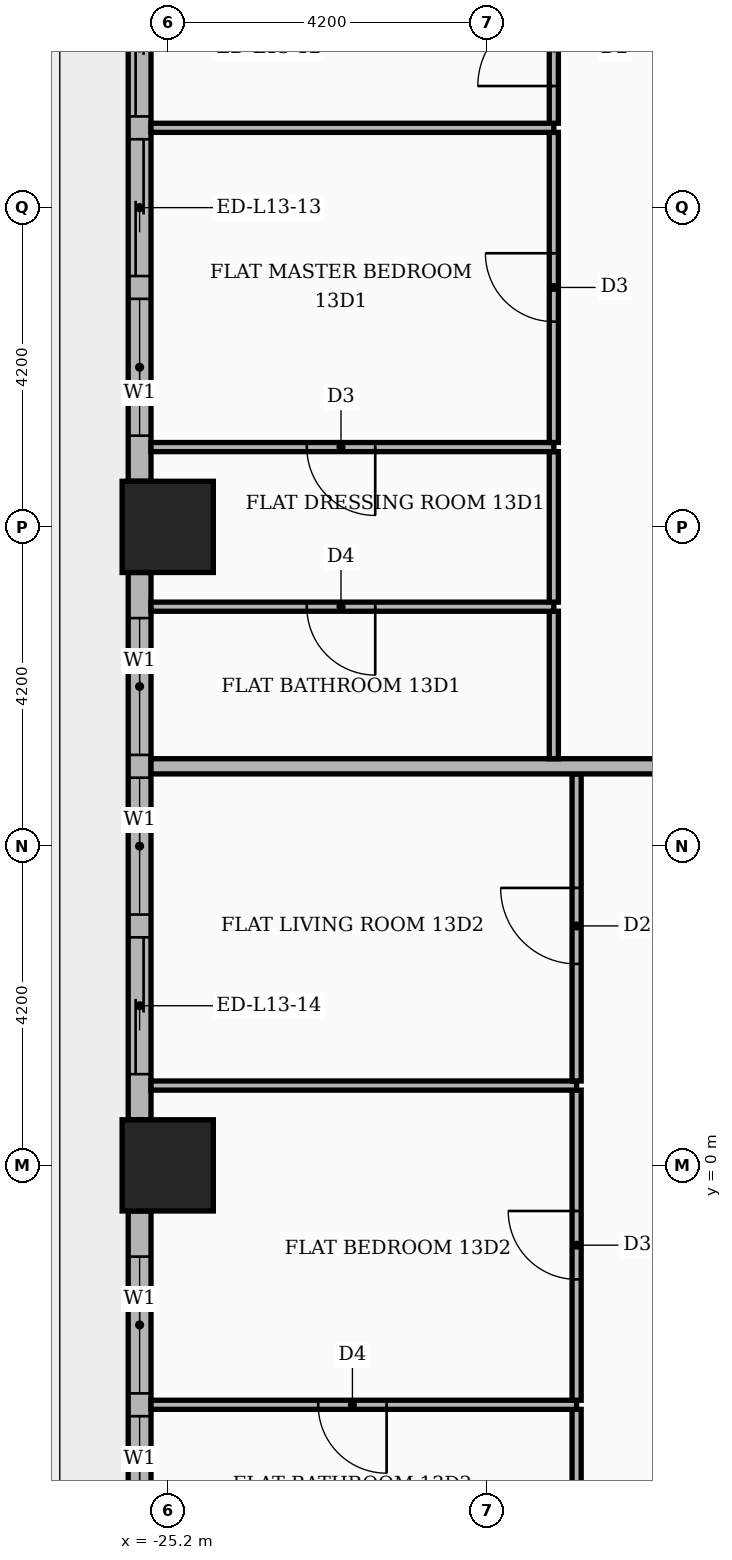
"""IFC4 building model, lengths in metres.
Left out: names, types, materials, properties, quantities, classifications, styles, units other than length and angle.
Written with IfcOpenShell. Run it as: python <this file> out.ifc"""

import sys

from ifc_helpers import new_model, si_unit, direction, frame, frame_2d, origin, origin_2d, place, context, subcontext, project, spatial, rectangle, extrude, element, fill, save


model = new_model("IFC4")
c1 = context("Model", 3, precision=1e-05, world=origin(), true_north=direction((0.0, 1.0)))
c2 = subcontext(c1, "Body", "Model", "MODEL_VIEW")
j1 = project(units=[si_unit("LENGTHUNIT", "METRE"), si_unit("PLANEANGLEUNIT", "RADIAN")], contexts=[c1])
p1 = place(None, origin())
s1 = spatial("IfcSite", under=j1, at=p1, CompositionType="ELEMENT")
p2 = place(p1, origin())
s2 = spatial("IfcBuilding", under=s1, at=p2, CompositionType="ELEMENT")
p3 = place(p2, frame((0.0, 0.0, 58.2)))
s3 = spatial("IfcBuildingStorey", under=s2, at=p3, CompositionType="ELEMENT", Elevation=58.2)
for number, where, z_axis, x_axis in (
    (1, (-25.2, 0.0, 0.0), (0.0, 0.0, 1.0), (1.0, 0.0, 0.0)),
    (2, (-25.2, 8.4, 0.0), (0.0, 0.0, 1.0), (1.0, 0.0, 0.0)),
):
    element("IfcColumn", number, at=place(p3, frame(where, z_axis=z_axis, x_axis=x_axis)), inside=s3, PredefinedType="COLUMN", context=c2, shape_type="SweptSolid", body=[
        extrude(rectangle(XDim=1.2, YDim=1.2, at=origin_2d()), origin(), (0.0, 0.0, 1.0), 3.9),
    ])
p4 = place(p3, frame((-25.57, 16.2, 0.0), z_axis=(0.0, 0.0, 1.0), x_axis=(0.0, -1.0, 0.0)))
e3 = element("IfcWall", 3, at=p4, inside=s3, PredefinedType="STANDARD", context=c2, shape_type="SweptSolid", body=[
    extrude(rectangle(XDim=7.2, YDim=0.3, at=frame_2d((3.6, 0.0))), origin(), (0.0, 0.0, 1.0), 3.48),
])
p5 = place(p4, frame((0.6, 0.0, 0.0)))
e4 = element("IfcOpeningElement", 4, at=p5, cuts=e3, PredefinedType="OPENING", context=c2, shape_type="SweptSolid", body=[
    extrude(rectangle(XDim=1.8, YDim=2.4, at=frame_2d((0.9, 1.2))), frame((0.0, 0.16, 0.0), z_axis=(0.0, -1.0, 0.0), x_axis=(1.0, 0.0, 0.0)), (0.0, 0.0, 1.0), 0.32),
])
p6 = place(p4, frame((2.7, 0.0, 0.0)))
e5 = element("IfcOpeningElement", 5, at=p6, cuts=e3, PredefinedType="OPENING", context=c2, shape_type="SweptSolid", body=[
    extrude(rectangle(XDim=1.8, YDim=2.4, at=frame_2d((0.9, 1.2))), frame((0.0, 0.16, 0.0), z_axis=(0.0, -1.0, 0.0), x_axis=(1.0, 0.0, 0.0)), (0.0, 0.0, 1.0), 0.32),
])
p7 = place(p4, frame((4.8, 0.0, 0.9)))
e6 = element("IfcOpeningElement", 6, at=p7, cuts=e3, PredefinedType="OPENING", context=c2, shape_type="SweptSolid", body=[
    extrude(rectangle(XDim=1.8, YDim=2.1, at=frame_2d((0.9, 1.05))), frame((0.0, 0.16, 0.0), z_axis=(0.0, -1.0, 0.0), x_axis=(1.0, 0.0, 0.0)), (0.0, 0.0, 1.0), 0.32),
])
p8 = place(p3, frame((-25.57, 7.8, 0.0), z_axis=(0.0, 0.0, 1.0), x_axis=(0.0, -1.0, 0.0)))
e7 = element("IfcWall", 7, at=p8, inside=s3, PredefinedType="STANDARD", context=c2, shape_type="SweptSolid", body=[
    extrude(rectangle(XDim=7.2, YDim=0.3, at=frame_2d((3.6, 0.0))), origin(), (0.0, 0.0, 1.0), 3.48),
])
p9 = place(p8, frame((0.6, 0.0, 0.9)))
e8 = element("IfcOpeningElement", 8, at=p9, cuts=e7, PredefinedType="OPENING", context=c2, shape_type="SweptSolid", body=[
    extrude(rectangle(XDim=1.8, YDim=2.1, at=frame_2d((0.9, 1.05))), frame((0.0, 0.16, 0.0), z_axis=(0.0, -1.0, 0.0), x_axis=(1.0, 0.0, 0.0)), (0.0, 0.0, 1.0), 0.32),
])
p10 = place(p8, frame((2.7, 0.0, 0.9)))
e9 = element("IfcOpeningElement", 9, at=p10, cuts=e7, PredefinedType="OPENING", context=c2, shape_type="SweptSolid", body=[
    extrude(rectangle(XDim=1.8, YDim=2.1, at=frame_2d((0.9, 1.05))), frame((0.0, 0.16, 0.0), z_axis=(0.0, -1.0, 0.0), x_axis=(1.0, 0.0, 0.0)), (0.0, 0.0, 1.0), 0.32),
])
p11 = place(p8, frame((4.8, 0.0, 0.0)))
e10 = element("IfcOpeningElement", 10, at=p11, cuts=e7, PredefinedType="OPENING", context=c2, shape_type="SweptSolid", body=[
    extrude(rectangle(XDim=1.8, YDim=2.4, at=frame_2d((0.9, 1.2))), frame((0.0, 0.16, 0.0), z_axis=(0.0, -1.0, 0.0), x_axis=(1.0, 0.0, 0.0)), (0.0, 0.0, 1.0), 0.32),
])
p12 = place(p3, frame((-25.57, -0.6, 0.0), z_axis=(0.0, 0.0, 1.0), x_axis=(0.0, -1.0, 0.0)))
e11 = element("IfcWall", 11, at=p12, inside=s3, PredefinedType="STANDARD", context=c2, shape_type="SweptSolid", body=[
    extrude(rectangle(XDim=7.2, YDim=0.3, at=frame_2d((3.6, 0.0))), origin(), (0.0, 0.0, 1.0), 3.48),
])
p13 = place(p12, frame((0.6, 0.0, 0.9)))
e12 = element("IfcOpeningElement", 12, at=p13, cuts=e11, PredefinedType="OPENING", context=c2, shape_type="SweptSolid", body=[
    extrude(rectangle(XDim=1.8, YDim=2.1, at=frame_2d((0.9, 1.05))), frame((0.0, 0.16, 0.0), z_axis=(0.0, -1.0, 0.0), x_axis=(1.0, 0.0, 0.0)), (0.0, 0.0, 1.0), 0.32),
])
p14 = place(p12, frame((2.7, 0.0, 0.9)))
e13 = element("IfcOpeningElement", 13, at=p14, cuts=e11, PredefinedType="OPENING", context=c2, shape_type="SweptSolid", body=[
    extrude(rectangle(XDim=1.8, YDim=2.1, at=frame_2d((0.9, 1.05))), frame((0.0, 0.16, 0.0), z_axis=(0.0, -1.0, 0.0), x_axis=(1.0, 0.0, 0.0)), (0.0, 0.0, 1.0), 0.32),
])
p15 = place(p12, frame((4.8, 0.0, 0.0)))
e14 = element("IfcOpeningElement", 14, at=p15, cuts=e11, PredefinedType="OPENING", context=c2, shape_type="SweptSolid", body=[
    extrude(rectangle(XDim=1.8, YDim=2.4, at=frame_2d((0.9, 1.2))), frame((0.0, 0.16, 0.0), z_axis=(0.0, -1.0, 0.0), x_axis=(1.0, 0.0, 0.0)), (0.0, 0.0, 1.0), 0.32),
])
p16 = place(p3, frame((-19.82, -5.19, 0.0), z_axis=(0.0, 0.0, 1.0), x_axis=(0.0, 1.0, 0.0)))
e15 = element("IfcWall", 15, at=p16, inside=s3, PredefinedType="PARTITIONING", context=c2, shape_type="SweptSolid", body=[
    extrude(rectangle(XDim=1.98, YDim=0.12, at=frame_2d((0.99, 0.0))), origin(), (0.0, 0.0, 1.0), 3.48),
])
p17 = place(p3, frame((-25.42, -3.15, 0.0), z_axis=(0.0, 0.0, 1.0), x_axis=(1.0, 0.0, 0.0)))
e16 = element("IfcWall", 16, at=p17, inside=s3, PredefinedType="PARTITIONING", context=c2, shape_type="SweptSolid", body=[
    extrude(rectangle(XDim=5.6, YDim=0.12, at=frame_2d((2.8, 0.0))), origin(), (0.0, 0.0, 1.0), 3.48),
])
p18 = place(p17, frame((2.2, 0.0, 0.0)))
e17 = element("IfcOpeningElement", 17, at=p18, cuts=e16, PredefinedType="OPENING", context=c2, shape_type="SweptSolid", body=[
    extrude(rectangle(XDim=0.9, YDim=2.1, at=frame_2d((0.45, 1.05))), frame((0.0, 0.07, 0.0), z_axis=(0.0, -1.0, 0.0), x_axis=(1.0, 0.0, 0.0)), (0.0, 0.0, 1.0), 0.14),
])
p19 = place(p3, frame((-19.82, -3.09, 0.0), z_axis=(0.0, 0.0, 1.0), x_axis=(0.0, 1.0, 0.0)))
e18 = element("IfcWall", 18, at=p19, inside=s3, PredefinedType="PARTITIONING", context=c2, shape_type="SweptSolid", body=[
    extrude(rectangle(XDim=4.08, YDim=0.12, at=frame_2d((2.04, 0.0))), origin(), (0.0, 0.0, 1.0), 3.48),
])
p20 = place(p19, frame((1.59, 0.0, 0.0)))
e19 = element("IfcOpeningElement", 19, at=p20, cuts=e18, PredefinedType="OPENING", context=c2, shape_type="SweptSolid", body=[
    extrude(rectangle(XDim=0.9, YDim=2.1, at=frame_2d((0.45, 1.05))), frame((0.0, 0.07, 0.0), z_axis=(0.0, -1.0, 0.0), x_axis=(1.0, 0.0, 0.0)), (0.0, 0.0, 1.0), 0.14),
])
p21 = place(p3, frame((-25.42, 1.05, 0.0), z_axis=(0.0, 0.0, 1.0), x_axis=(1.0, 0.0, 0.0)))
e20 = element("IfcWall", 20, at=p21, inside=s3, PredefinedType="PARTITIONING", context=c2, shape_type="SweptSolid", body=[
    extrude(rectangle(XDim=5.6, YDim=0.12, at=frame_2d((2.8, 0.0))), origin(), (0.0, 0.0, 1.0), 3.48),
])
p22 = place(p3, frame((-19.82, 1.11, 0.0), z_axis=(0.0, 0.0, 1.0), x_axis=(0.0, 1.0, 0.0)))
e21 = element("IfcWall", 21, at=p22, inside=s3, PredefinedType="PARTITIONING", context=c2, shape_type="SweptSolid", body=[
    extrude(rectangle(XDim=4.04, YDim=0.12, at=frame_2d((2.02, 0.0))), origin(), (0.0, 0.0, 1.0), 3.48),
])
p23 = place(p22, frame((1.54, 0.0, 0.0)))
e22 = element("IfcOpeningElement", 22, at=p23, cuts=e21, PredefinedType="OPENING", context=c2, shape_type="SweptSolid", body=[
    extrude(rectangle(XDim=1.0, YDim=2.1, at=frame_2d((0.5, 1.05))), frame((0.0, 0.07, 0.0), z_axis=(0.0, -1.0, 0.0), x_axis=(1.0, 0.0, 0.0)), (0.0, 0.0, 1.0), 0.14),
])
p24 = place(p3, frame((-25.42, 5.25, 0.0), z_axis=(0.0, 0.0, 1.0), x_axis=(1.0, 0.0, 0.0)))
e23 = element("IfcWall", 23, at=p24, inside=s3, PredefinedType="PARTITIONING", context=c2, shape_type="SweptSolid", body=[
    extrude(rectangle(XDim=11.77, YDim=0.2, at=frame_2d((5.885, 0.0))), origin(), (0.0, 0.0, 1.0), 3.48),
])
p25 = place(p3, frame((-20.12, 5.35, 0.0), z_axis=(0.0, 0.0, 1.0), x_axis=(0.0, 1.0, 0.0)))
e24 = element("IfcWall", 24, at=p25, inside=s3, PredefinedType="PARTITIONING", context=c2, shape_type="SweptSolid", body=[
    extrude(rectangle(XDim=1.94, YDim=0.12, at=frame_2d((0.97, 0.0))), origin(), (0.0, 0.0, 1.0), 3.48),
])
p26 = place(p3, frame((-25.42, 7.35, 0.0), z_axis=(0.0, 0.0, 1.0), x_axis=(1.0, 0.0, 0.0)))
e25 = element("IfcWall", 25, at=p26, inside=s3, PredefinedType="PARTITIONING", context=c2, shape_type="SweptSolid", body=[
    extrude(rectangle(XDim=5.3, YDim=0.12, at=frame_2d((2.65, 0.0))), origin(), (0.0, 0.0, 1.0), 3.48),
])
p27 = place(p26, frame((2.05, 0.0, 0.0)))
e26 = element("IfcOpeningElement", 26, at=p27, cuts=e25, PredefinedType="OPENING", context=c2, shape_type="SweptSolid", body=[
    extrude(rectangle(XDim=0.9, YDim=2.1, at=frame_2d((0.45, 1.05))), frame((0.0, 0.07, 0.0), z_axis=(0.0, -1.0, 0.0), x_axis=(1.0, 0.0, 0.0)), (0.0, 0.0, 1.0), 0.14),
])
p28 = place(p3, frame((-20.12, 7.41, 0.0), z_axis=(0.0, 0.0, 1.0), x_axis=(0.0, 1.0, 0.0)))
e27 = element("IfcWall", 27, at=p28, inside=s3, PredefinedType="PARTITIONING", context=c2, shape_type="SweptSolid", body=[
    extrude(rectangle(XDim=1.98, YDim=0.12, at=frame_2d((0.99, 0.0))), origin(), (0.0, 0.0, 1.0), 3.48),
])
p29 = place(p3, frame((-25.42, 9.45, 0.0), z_axis=(0.0, 0.0, 1.0), x_axis=(1.0, 0.0, 0.0)))
e28 = element("IfcWall", 28, at=p29, inside=s3, PredefinedType="PARTITIONING", context=c2, shape_type="SweptSolid", body=[
    extrude(rectangle(XDim=5.3, YDim=0.12, at=frame_2d((2.65, 0.0))), origin(), (0.0, 0.0, 1.0), 3.48),
])
p30 = place(p29, frame((2.05, 0.0, 0.0)))
e29 = element("IfcOpeningElement", 29, at=p30, cuts=e28, PredefinedType="OPENING", context=c2, shape_type="SweptSolid", body=[
    extrude(rectangle(XDim=0.9, YDim=2.1, at=frame_2d((0.45, 1.05))), frame((0.0, 0.07, 0.0), z_axis=(0.0, -1.0, 0.0), x_axis=(1.0, 0.0, 0.0)), (0.0, 0.0, 1.0), 0.14),
])
p31 = place(p3, frame((-20.12, 9.51, 0.0), z_axis=(0.0, 0.0, 1.0), x_axis=(0.0, 1.0, 0.0)))
e30 = element("IfcWall", 30, at=p31, inside=s3, PredefinedType="PARTITIONING", context=c2, shape_type="SweptSolid", body=[
    extrude(rectangle(XDim=4.08, YDim=0.12, at=frame_2d((2.04, 0.0))), origin(), (0.0, 0.0, 1.0), 3.48),
])
p32 = place(p31, frame((1.59, 0.0, 0.0)))
e31 = element("IfcOpeningElement", 31, at=p32, cuts=e30, PredefinedType="OPENING", context=c2, shape_type="SweptSolid", body=[
    extrude(rectangle(XDim=0.9, YDim=2.1, at=frame_2d((0.45, 1.05))), frame((0.0, 0.07, 0.0), z_axis=(0.0, -1.0, 0.0), x_axis=(1.0, 0.0, 0.0)), (0.0, 0.0, 1.0), 0.14),
])
p33 = place(p3, frame((-25.42, 13.65, 0.0), z_axis=(0.0, 0.0, 1.0), x_axis=(1.0, 0.0, 0.0)))
e32 = element("IfcWall", 32, at=p33, inside=s3, PredefinedType="PARTITIONING", context=c2, shape_type="SweptSolid", body=[
    extrude(rectangle(XDim=5.3, YDim=0.12, at=frame_2d((2.65, 0.0))), origin(), (0.0, 0.0, 1.0), 3.48),
])
p34 = place(p3, frame((-20.12, 13.71, 0.0), z_axis=(0.0, 0.0, 1.0), x_axis=(0.0, 1.0, 0.0)))
e33 = element("IfcWall", 33, at=p34, inside=s3, PredefinedType="PARTITIONING", context=c2, shape_type="SweptSolid", body=[
    extrude(rectangle(XDim=1.98, YDim=0.12, at=frame_2d((0.99, 0.0))), origin(), (0.0, 0.0, 1.0), 3.48),
])
p35 = place(p34, frame((0.49, 0.0, 0.0)))
e34 = element("IfcOpeningElement", 34, at=p35, cuts=e33, PredefinedType="OPENING", context=c2, shape_type="SweptSolid", body=[
    extrude(rectangle(XDim=1.0, YDim=2.1, at=frame_2d((0.5, 1.05))), frame((0.0, 0.07, 0.0), z_axis=(0.0, -1.0, 0.0), x_axis=(1.0, 0.0, 0.0)), (0.0, 0.0, 1.0), 0.14),
])
p36 = place(p5, origin())
e35 = element("IfcDoor", 35, at=p36, inside=s3, OperationType="SLIDING_TO_LEFT", PredefinedType="DOOR", context=c2, shape_type="SweptSolid", body=[
    extrude(rectangle(XDim=1.8, YDim=2.4, at=frame_2d((0.9, 1.2))), frame((0.0, 0.025, 0.0), z_axis=(0.0, -1.0, 0.0), x_axis=(1.0, 0.0, 0.0)), (0.0, 0.0, 1.0), 0.05),
])
fill(e4, e35)
p37 = place(p6, origin())
e36 = element("IfcDoor", 36, at=p37, inside=s3, OperationType="SLIDING_TO_RIGHT", PredefinedType="DOOR", context=c2, shape_type="SweptSolid", body=[
    extrude(rectangle(XDim=1.8, YDim=2.4, at=frame_2d((0.9, 1.2))), frame((0.0, 0.025, 0.0), z_axis=(0.0, -1.0, 0.0), x_axis=(1.0, 0.0, 0.0)), (0.0, 0.0, 1.0), 0.05),
])
fill(e5, e36)
p38 = place(p7, origin())
e37 = element("IfcWindow", 37, at=p38, inside=s3, PartitioningType="SINGLE_PANEL", PredefinedType="WINDOW", context=c2, shape_type="SweptSolid", body=[
    extrude(rectangle(XDim=1.8, YDim=2.1, at=frame_2d((0.9, 1.05))), frame((0.0, 0.03, 0.0), z_axis=(0.0, -1.0, 0.0), x_axis=(1.0, 0.0, 0.0)), (0.0, 0.0, 1.0), 0.06),
])
fill(e6, e37)
p39 = place(p9, origin())
e38 = element("IfcWindow", 38, at=p39, inside=s3, PartitioningType="SINGLE_PANEL", PredefinedType="WINDOW", context=c2, shape_type="SweptSolid", body=[
    extrude(rectangle(XDim=1.8, YDim=2.1, at=frame_2d((0.9, 1.05))), frame((0.0, 0.03, 0.0), z_axis=(0.0, -1.0, 0.0), x_axis=(1.0, 0.0, 0.0)), (0.0, 0.0, 1.0), 0.06),
])
fill(e8, e38)
p40 = place(p10, origin())
e39 = element("IfcWindow", 39, at=p40, inside=s3, PartitioningType="SINGLE_PANEL", PredefinedType="WINDOW", context=c2, shape_type="SweptSolid", body=[
    extrude(rectangle(XDim=1.8, YDim=2.1, at=frame_2d((0.9, 1.05))), frame((0.0, 0.03, 0.0), z_axis=(0.0, -1.0, 0.0), x_axis=(1.0, 0.0, 0.0)), (0.0, 0.0, 1.0), 0.06),
])
fill(e9, e39)
p41 = place(p11, origin())
e40 = element("IfcDoor", 40, at=p41, inside=s3, OperationType="SLIDING_TO_RIGHT", PredefinedType="DOOR", context=c2, shape_type="SweptSolid", body=[
    extrude(rectangle(XDim=1.8, YDim=2.4, at=frame_2d((0.9, 1.2))), frame((0.0, 0.025, 0.0), z_axis=(0.0, -1.0, 0.0), x_axis=(1.0, 0.0, 0.0)), (0.0, 0.0, 1.0), 0.05),
])
fill(e10, e40)
p42 = place(p13, origin())
e41 = element("IfcWindow", 41, at=p42, inside=s3, PartitioningType="SINGLE_PANEL", PredefinedType="WINDOW", context=c2, shape_type="SweptSolid", body=[
    extrude(rectangle(XDim=1.8, YDim=2.1, at=frame_2d((0.9, 1.05))), frame((0.0, 0.03, 0.0), z_axis=(0.0, -1.0, 0.0), x_axis=(1.0, 0.0, 0.0)), (0.0, 0.0, 1.0), 0.06),
])
fill(e12, e41)
p43 = place(p14, origin())
e42 = element("IfcWindow", 42, at=p43, inside=s3, PartitioningType="SINGLE_PANEL", PredefinedType="WINDOW", context=c2, shape_type="SweptSolid", body=[
    extrude(rectangle(XDim=1.8, YDim=2.1, at=frame_2d((0.9, 1.05))), frame((0.0, 0.03, 0.0), z_axis=(0.0, -1.0, 0.0), x_axis=(1.0, 0.0, 0.0)), (0.0, 0.0, 1.0), 0.06),
])
fill(e13, e42)
p44 = place(p35, origin())
e43 = element("IfcDoor", 43, at=p44, inside=s3, OperationType="SINGLE_SWING_LEFT", PredefinedType="DOOR", context=c2, shape_type="SweptSolid", body=[
    extrude(rectangle(XDim=1.0, YDim=2.1, at=frame_2d((0.5, 1.05))), frame((0.0, 0.025, 0.0), z_axis=(0.0, -1.0, 0.0), x_axis=(1.0, 0.0, 0.0)), (0.0, 0.0, 1.0), 0.05),
])
fill(e34, e43)
p45 = place(p32, origin())
e44 = element("IfcDoor", 44, at=p45, inside=s3, OperationType="SINGLE_SWING_RIGHT", PredefinedType="DOOR", context=c2, shape_type="SweptSolid", body=[
    extrude(rectangle(XDim=0.9, YDim=2.1, at=frame_2d((0.45, 1.05))), frame((0.0, 0.025, 0.0), z_axis=(0.0, -1.0, 0.0), x_axis=(1.0, 0.0, 0.0)), (0.0, 0.0, 1.0), 0.05),
])
fill(e31, e44)
p46 = place(p30, frame((0.9, 0.0, 0.0), z_axis=(0.0, 0.0, 1.0), x_axis=(-1.0, 0.0, 0.0)))
e45 = element("IfcDoor", 45, at=p46, inside=s3, OperationType="SINGLE_SWING_RIGHT", PredefinedType="DOOR", context=c2, shape_type="SweptSolid", body=[
    extrude(rectangle(XDim=0.9, YDim=2.1, at=frame_2d((0.45, 1.05))), frame((0.0, 0.025, 0.0), z_axis=(0.0, -1.0, 0.0), x_axis=(1.0, 0.0, 0.0)), (0.0, 0.0, 1.0), 0.05),
])
fill(e29, e45)
p47 = place(p27, frame((0.9, 0.0, 0.0), z_axis=(0.0, 0.0, 1.0), x_axis=(-1.0, 0.0, 0.0)))
e46 = element("IfcDoor", 46, at=p47, inside=s3, OperationType="SINGLE_SWING_RIGHT", PredefinedType="DOOR", context=c2, shape_type="SweptSolid", body=[
    extrude(rectangle(XDim=0.9, YDim=2.1, at=frame_2d((0.45, 1.05))), frame((0.0, 0.025, 0.0), z_axis=(0.0, -1.0, 0.0), x_axis=(1.0, 0.0, 0.0)), (0.0, 0.0, 1.0), 0.05),
])
fill(e26, e46)
p48 = place(p23, origin())
e47 = element("IfcDoor", 47, at=p48, inside=s3, OperationType="SINGLE_SWING_RIGHT", PredefinedType="DOOR", context=c2, shape_type="SweptSolid", body=[
    extrude(rectangle(XDim=1.0, YDim=2.1, at=frame_2d((0.5, 1.05))), frame((0.0, 0.025, 0.0), z_axis=(0.0, -1.0, 0.0), x_axis=(1.0, 0.0, 0.0)), (0.0, 0.0, 1.0), 0.05),
])
fill(e22, e47)
p49 = place(p20, origin())
e48 = element("IfcDoor", 48, at=p49, inside=s3, OperationType="SINGLE_SWING_RIGHT", PredefinedType="DOOR", context=c2, shape_type="SweptSolid", body=[
    extrude(rectangle(XDim=0.9, YDim=2.1, at=frame_2d((0.45, 1.05))), frame((0.0, 0.025, 0.0), z_axis=(0.0, -1.0, 0.0), x_axis=(1.0, 0.0, 0.0)), (0.0, 0.0, 1.0), 0.05),
])
fill(e19, e48)
p50 = place(p18, frame((0.9, 0.0, 0.0), z_axis=(0.0, 0.0, 1.0), x_axis=(-1.0, 0.0, 0.0)))
e49 = element("IfcDoor", 49, at=p50, inside=s3, OperationType="SINGLE_SWING_RIGHT", PredefinedType="DOOR", context=c2, shape_type="SweptSolid", body=[
    extrude(rectangle(XDim=0.9, YDim=2.1, at=frame_2d((0.45, 1.05))), frame((0.0, 0.025, 0.0), z_axis=(0.0, -1.0, 0.0), x_axis=(1.0, 0.0, 0.0)), (0.0, 0.0, 1.0), 0.05),
])
fill(e17, e49)
save(model, sys.argv[1])
